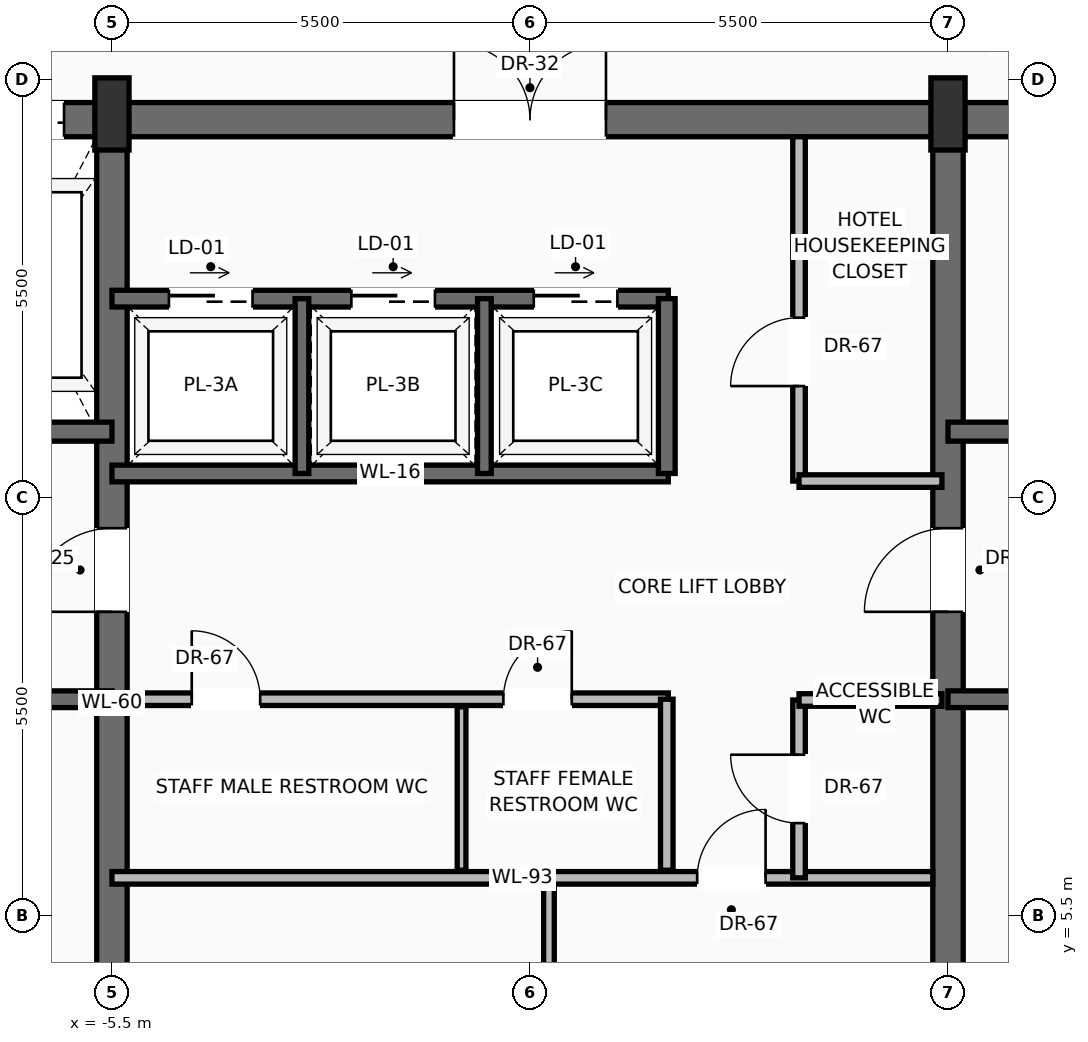
"""IFC4 building model, lengths in metres.
Left out: names, types, materials, properties, quantities, classifications, styles, units other than length and angle.
Written with IfcOpenShell. Run it as: python <this file> out.ifc"""

import sys

from ifc_helpers import new_model, si_unit, direction, frame, frame_2d, origin, origin_2d, place, context, subcontext, project, spatial, rectangle, extrude, source, transform, mapped, element, fill, save


model = new_model("IFC4")
c1 = context("Model", 3, precision=1e-05, world=origin(), true_north=direction((0.0, 1.0)))
c2 = subcontext(c1, "Body", "Model", "MODEL_VIEW")
j1 = project(units=[si_unit("LENGTHUNIT", "METRE"), si_unit("PLANEANGLEUNIT", "RADIAN")], contexts=[c1])
p1 = place(None, origin())
s1 = spatial("IfcSite", under=j1, at=p1, CompositionType="ELEMENT")
p2 = place(p1, origin())
s2 = spatial("IfcBuilding", under=s1, at=p2, CompositionType="ELEMENT")
p3 = place(p2, frame((0.0, 0.0, 273.0)))
s3 = spatial("IfcBuildingStorey", under=s2, at=p3, CompositionType="ELEMENT", Elevation=273.0)
p4 = place(p3, frame((-10.6, 15.975, 0.0), z_axis=(0.0, 0.0, 1.0), x_axis=(1.0, 0.0, 0.0)))
e1 = element("IfcWall", 1, at=p4, inside=s3, PredefinedType="SHEAR", context=c2, shape_type="SweptSolid", body=[
    extrude(rectangle(XDim=21.2, YDim=0.45, at=frame_2d((10.6, 0.0))), origin(), (0.0, 0.0, 1.0), 3.24),
])
p5 = place(p4, frame((3.17, 0.0, 0.0)))
e2 = element("IfcOpeningElement", 2, at=p5, cuts=e1, PredefinedType="OPENING", context=c2, shape_type="SweptSolid", body=[
    extrude(rectangle(XDim=1.3, YDim=2.3, at=frame_2d((0.65, 1.15))), frame((0.0, 0.235, 0.0), z_axis=(0.0, -1.0, 0.0), x_axis=(1.0, 0.0, 0.0)), (0.0, 0.0, 1.0), 0.47),
])
p6 = place(p4, frame((9.6, 0.0, 0.0)))
e3 = element("IfcOpeningElement", 3, at=p6, cuts=e1, PredefinedType="OPENING", context=c2, shape_type="SweptSolid", body=[
    extrude(rectangle(XDim=2.0, YDim=2.4, at=frame_2d((1.0, 1.2))), frame((0.0, 0.235, 0.0), z_axis=(0.0, -1.0, 0.0), x_axis=(1.0, 0.0, 0.0)), (0.0, 0.0, 1.0), 0.47),
])
p7 = place(p3, frame((-5.5, 0.625, 0.0), z_axis=(0.0, 0.0, 1.0), x_axis=(0.0, 1.0, 0.0)))
e4 = element("IfcWall", 4, at=p7, inside=s3, PredefinedType="SHEAR", context=c2, shape_type="SweptSolid", body=[
    extrude(rectangle(XDim=15.35, YDim=0.4, at=frame_2d((7.675, 0.0))), origin(), (0.0, 0.0, 1.0), 3.24),
])
p8 = place(p7, frame((8.875, 0.0, 0.0)))
e5 = element("IfcOpeningElement", 5, at=p8, cuts=e4, PredefinedType="OPENING", context=c2, shape_type="SweptSolid", body=[
    extrude(rectangle(XDim=1.1, YDim=2.2, at=frame_2d((0.55, 1.1))), frame((0.0, 0.21, 0.0), z_axis=(0.0, -1.0, 0.0), x_axis=(1.0, 0.0, 0.0)), (0.0, 0.0, 1.0), 0.42),
])
p9 = place(p3, frame((5.5, 0.625, 0.0), z_axis=(0.0, 0.0, 1.0), x_axis=(0.0, 1.0, 0.0)))
e6 = element("IfcWall", 6, at=p9, inside=s3, PredefinedType="SHEAR", context=c2, shape_type="SweptSolid", body=[
    extrude(rectangle(XDim=15.35, YDim=0.4, at=frame_2d((7.675, 0.0))), origin(), (0.0, 0.0, 1.0), 3.24),
])
p10 = place(p9, frame((8.875, 0.0, 0.0)))
e7 = element("IfcOpeningElement", 7, at=p10, cuts=e6, PredefinedType="OPENING", context=c2, shape_type="SweptSolid", body=[
    extrude(rectangle(XDim=1.1, YDim=2.2, at=frame_2d((0.55, 1.1))), frame((0.0, 0.21, 0.0), z_axis=(0.0, -1.0, 0.0), x_axis=(1.0, 0.0, 0.0)), (0.0, 0.0, 1.0), 0.42),
])
m1 = source(origin(), c2, "Body", "SweptSolid", [
    extrude(rectangle(XDim=0.45, YDim=0.95, at=origin_2d()), origin(), (0.0, 0.0, 1.0), 3.45),
])
for number, where, z_axis, x_axis in (
    (8, (-5.5, 16.05, 0.0), (0.0, 0.0, 1.0), (1.0, 0.0, 0.0)),
    (9, (5.5, 16.05, 0.0), (0.0, 0.0, 1.0), (1.0, 0.0, 0.0)),
):
    element("IfcColumn", number, at=place(p3, frame(where, z_axis=z_axis, x_axis=x_axis)), inside=s3, PredefinedType="PILASTER", context=c2, shape_type="MappedRepresentation", body=[
        mapped(m1, transform((0.0, 0.0, 0.0), scale=1.0)),
    ])
p11 = place(p3, frame((-5.5, 8.35, 0.0), z_axis=(0.0, 0.0, 1.0), x_axis=(-1.0, 0.0, 0.0)))
e10 = element("IfcWall", 10, at=p11, inside=s3, PredefinedType="SOLIDWALL", context=c2, shape_type="SweptSolid", body=[
    extrude(rectangle(XDim=4.65, YDim=0.22, at=frame_2d((2.325, 0.0))), origin(), (0.0, 0.0, 1.0), 3.24),
])
p12 = place(p11, frame((2.5, 0.0, 0.0)))
e11 = element("IfcOpeningElement", 11, at=p12, cuts=e10, PredefinedType="OPENING", context=c2, shape_type="SweptSolid", body=[
    extrude(rectangle(XDim=1.15, YDim=2.2, at=frame_2d((0.575, 1.1))), frame((0.0, 0.12, 0.0), z_axis=(0.0, -1.0, 0.0), x_axis=(1.0, 0.0, 0.0)), (0.0, 0.0, 1.0), 0.24),
])
p13 = place(p3, frame((-5.5, 11.87, 0.0), z_axis=(0.0, 0.0, 1.0), x_axis=(-1.0, 0.0, 0.0)))
e12 = element("IfcWall", 12, at=p13, inside=s3, PredefinedType="SOLIDWALL", context=c2, shape_type="SweptSolid", body=[
    extrude(rectangle(XDim=4.65, YDim=0.25, at=frame_2d((2.325, 0.0))), origin(), (0.0, 0.0, 1.0), 3.24),
])
p14 = place(p13, frame((2.95, 0.0, 0.0)))
e13 = element("IfcOpeningElement", 13, at=p14, cuts=e12, PredefinedType="OPENING", context=c2, shape_type="SweptSolid", body=[
    extrude(rectangle(XDim=1.2, YDim=2.25, at=frame_2d((0.6, 1.125))), frame((0.0, 0.135, 0.0), z_axis=(0.0, -1.0, 0.0), x_axis=(1.0, 0.0, 0.0)), (0.0, 0.0, 1.0), 0.27),
])
p15 = place(p3, frame((10.15, 8.35, 0.0), z_axis=(0.0, 0.0, 1.0), x_axis=(-1.0, 0.0, 0.0)))
e14 = element("IfcWall", 14, at=p15, inside=s3, PredefinedType="SOLIDWALL", context=c2, shape_type="SweptSolid", body=[
    extrude(rectangle(XDim=4.65, YDim=0.22, at=frame_2d((2.325, 0.0))), origin(), (0.0, 0.0, 1.0), 3.24),
])
p16 = place(p15, frame((1.0, 0.0, 0.0)))
e15 = element("IfcOpeningElement", 15, at=p16, cuts=e14, PredefinedType="OPENING", context=c2, shape_type="SweptSolid", body=[
    extrude(rectangle(XDim=1.15, YDim=2.2, at=frame_2d((0.575, 1.1))), frame((0.0, 0.12, 0.0), z_axis=(0.0, -1.0, 0.0), x_axis=(1.0, 0.0, 0.0)), (0.0, 0.0, 1.0), 0.24),
])
p17 = place(p3, frame((10.15, 11.87, 0.0), z_axis=(0.0, 0.0, 1.0), x_axis=(-1.0, 0.0, 0.0)))
e16 = element("IfcWall", 16, at=p17, inside=s3, PredefinedType="SOLIDWALL", context=c2, shape_type="SweptSolid", body=[
    extrude(rectangle(XDim=4.65, YDim=0.25, at=frame_2d((2.325, 0.0))), origin(), (0.0, 0.0, 1.0), 3.24),
])
p18 = place(p17, frame((0.5, 0.0, 0.0)))
e17 = element("IfcOpeningElement", 17, at=p18, cuts=e16, PredefinedType="OPENING", context=c2, shape_type="SweptSolid", body=[
    extrude(rectangle(XDim=1.2, YDim=2.25, at=frame_2d((0.6, 1.125))), frame((0.0, 0.135, 0.0), z_axis=(0.0, -1.0, 0.0), x_axis=(1.0, 0.0, 0.0)), (0.0, 0.0, 1.0), 0.27),
])
p19 = place(p3, frame((-5.5, 6.0, 0.0), z_axis=(0.0, 0.0, 1.0), x_axis=(1.0, 0.0, 0.0)))
e18 = element("IfcWall", 18, at=p19, inside=s3, PredefinedType="PARTITIONING", context=c2, shape_type="SweptSolid", body=[
    extrude(rectangle(XDim=10.8, YDim=0.165, at=frame_2d((5.4, 0.0))), origin(), (0.0, 0.0, 1.0), 3.232),
])
p20 = place(p19, frame((7.7, 0.0, 0.0)))
e19 = element("IfcOpeningElement", 19, at=p20, cuts=e18, PredefinedType="OPENING", context=c2, shape_type="SweptSolid", body=[
    extrude(rectangle(XDim=0.9, YDim=2.1, at=frame_2d((0.45, 1.05))), frame((0.0, 0.093, 0.0), z_axis=(0.0, -1.0, 0.0), x_axis=(1.0, 0.0, 0.0)), (0.0, 0.0, 1.0), 0.185),
])
p21 = place(p3, frame((0.25, 0.85, 0.0), z_axis=(0.0, 0.0, 1.0), x_axis=(0.0, 1.0, 0.0)))
e20 = element("IfcWall", 20, at=p21, inside=s3, PredefinedType="PARTITIONING", context=c2, shape_type="SweptSolid", body=[
    extrude(rectangle(XDim=5.03, YDim=0.14, at=frame_2d((2.515, 0.0))), origin(), (0.0, 0.0, 1.0), 3.232),
])
p22 = place(p21, frame((2.1, 0.0, 0.0)))
e21 = element("IfcOpeningElement", 21, at=p22, cuts=e20, PredefinedType="OPENING", context=c2, shape_type="SweptSolid", body=[
    extrude(rectangle(XDim=0.9, YDim=2.1, at=frame_2d((0.45, 1.05))), frame((0.0, 0.08, 0.0), z_axis=(0.0, -1.0, 0.0), x_axis=(1.0, 0.0, 0.0)), (0.0, 0.0, 1.0), 0.16),
])
p23 = place(p3, frame((3.54, 6.0, 0.0), z_axis=(0.0, 0.0, 1.0), x_axis=(0.0, 1.0, 0.0)))
e22 = element("IfcWall", 22, at=p23, inside=s3, PredefinedType="PARTITIONING", context=c2, shape_type="SweptSolid", body=[
    extrude(rectangle(XDim=2.34, YDim=0.165, at=frame_2d((1.17, 0.0))), origin(), (0.0, 0.0, 1.0), 3.232),
])
p24 = place(p23, frame((0.72, 0.0, 0.0)))
e23 = element("IfcOpeningElement", 23, at=p24, cuts=e22, PredefinedType="OPENING", context=c2, shape_type="SweptSolid", body=[
    extrude(rectangle(XDim=0.9, YDim=2.1, at=frame_2d((0.45, 1.05))), frame((0.0, 0.093, 0.0), z_axis=(0.0, -1.0, 0.0), x_axis=(1.0, 0.0, 0.0)), (0.0, 0.0, 1.0), 0.185),
])
p25 = place(p3, frame((3.54, 8.34, 0.0), z_axis=(0.0, 0.0, 1.0), x_axis=(1.0, 0.0, 0.0)))
e24 = element("IfcWall", 24, at=p25, inside=s3, PredefinedType="PARTITIONING", context=c2, shape_type="SweptSolid", body=[
    extrude(rectangle(XDim=1.88, YDim=0.165, at=frame_2d((0.94, 0.0))), origin(), (0.0, 0.0, 1.0), 3.232),
])
p26 = place(p3, frame((-5.3, 8.35, 0.0), z_axis=(0.0, 0.0, 1.0), x_axis=(1.0, 0.0, 0.0)))
e25 = element("IfcWall", 25, at=p26, inside=s3, PredefinedType="PARTITIONING", context=c2, shape_type="SweptSolid", body=[
    extrude(rectangle(XDim=7.12, YDim=0.165, at=frame_2d((3.56, 0.0))), origin(), (0.0, 0.0, 1.0), 3.232),
])
p27 = place(p26, frame((0.85, 0.0, 0.0)))
e26 = element("IfcOpeningElement", 26, at=p27, cuts=e25, PredefinedType="OPENING", context=c2, shape_type="SweptSolid", body=[
    extrude(rectangle(XDim=0.9, YDim=2.1, at=frame_2d((0.45, 1.05))), frame((0.0, 0.093, 0.0), z_axis=(0.0, -1.0, 0.0), x_axis=(1.0, 0.0, 0.0)), (0.0, 0.0, 1.0), 0.185),
])
p28 = place(p26, frame((4.95, 0.0, 0.0)))
e27 = element("IfcOpeningElement", 27, at=p28, cuts=e25, PredefinedType="OPENING", context=c2, shape_type="SweptSolid", body=[
    extrude(rectangle(XDim=0.9, YDim=2.1, at=frame_2d((0.45, 1.05))), frame((0.0, 0.093, 0.0), z_axis=(0.0, -1.0, 0.0), x_axis=(1.0, 0.0, 0.0)), (0.0, 0.0, 1.0), 0.185),
])
p29 = place(p3, frame((1.8, 6.1, 0.0), z_axis=(0.0, 0.0, 1.0), x_axis=(0.0, 1.0, 0.0)))
e28 = element("IfcWall", 28, at=p29, inside=s3, PredefinedType="PARTITIONING", context=c2, shape_type="SweptSolid", body=[
    extrude(rectangle(XDim=2.25, YDim=0.165, at=frame_2d((1.125, 0.0))), origin(), (0.0, 0.0, 1.0), 3.232),
])
p30 = place(p3, frame((-0.9, 6.1, 0.0), z_axis=(0.0, 0.0, 1.0), x_axis=(0.0, 1.0, 0.0)))
e29 = element("IfcWall", 29, at=p30, inside=s3, PredefinedType="PARTITIONING", context=c2, shape_type="SweptSolid", body=[
    extrude(rectangle(XDim=2.15, YDim=0.115, at=frame_2d((1.075, 0.0))), origin(), (0.0, 0.0, 1.0), 3.232),
])
p31 = place(p3, frame((-5.5, 11.32, 0.0), z_axis=(0.0, 0.0, 1.0), x_axis=(1.0, 0.0, 0.0)))
e30 = element("IfcWall", 30, at=p31, inside=s3, PredefinedType="SOLIDWALL", context=c2, shape_type="SweptSolid", body=[
    extrude(rectangle(XDim=7.32, YDim=0.22, at=frame_2d((3.66, 0.0))), origin(), (0.0, 0.0, 1.0), 3.24),
])
p32 = place(p3, frame((-5.5, 13.62, 0.0), z_axis=(0.0, 0.0, 1.0), x_axis=(1.0, 0.0, 0.0)))
e31 = element("IfcWall", 31, at=p32, inside=s3, PredefinedType="SOLIDWALL", context=c2, shape_type="SweptSolid", body=[
    extrude(rectangle(XDim=7.32, YDim=0.22, at=frame_2d((3.66, 0.0))), origin(), (0.0, 0.0, 1.0), 3.24),
])
p33 = place(p32, frame((0.75, 0.0, 0.0)))
e32 = element("IfcOpeningElement", 32, at=p33, cuts=e31, PredefinedType="OPENING", context=c2, shape_type="SweptSolid", body=[
    extrude(rectangle(XDim=1.1, YDim=2.2, at=frame_2d((0.55, 1.1))), frame((0.0, 0.12, 0.0), z_axis=(0.0, -1.0, 0.0), x_axis=(1.0, 0.0, 0.0)), (0.0, 0.0, 1.0), 0.24),
])
p34 = place(p32, frame((3.15, 0.0, 0.0)))
e33 = element("IfcOpeningElement", 33, at=p34, cuts=e31, PredefinedType="OPENING", context=c2, shape_type="SweptSolid", body=[
    extrude(rectangle(XDim=1.1, YDim=2.2, at=frame_2d((0.55, 1.1))), frame((0.0, 0.12, 0.0), z_axis=(0.0, -1.0, 0.0), x_axis=(1.0, 0.0, 0.0)), (0.0, 0.0, 1.0), 0.24),
])
p35 = place(p32, frame((5.55, 0.0, 0.0)))
e34 = element("IfcOpeningElement", 34, at=p35, cuts=e31, PredefinedType="OPENING", context=c2, shape_type="SweptSolid", body=[
    extrude(rectangle(XDim=1.1, YDim=2.2, at=frame_2d((0.55, 1.1))), frame((0.0, 0.12, 0.0), z_axis=(0.0, -1.0, 0.0), x_axis=(1.0, 0.0, 0.0)), (0.0, 0.0, 1.0), 0.24),
])
p36 = place(p3, frame((1.8, 11.32, 0.0), z_axis=(0.0, 0.0, 1.0), x_axis=(0.0, 1.0, 0.0)))
e35 = element("IfcWall", 35, at=p36, inside=s3, PredefinedType="SOLIDWALL", context=c2, shape_type="SweptSolid", body=[
    extrude(rectangle(XDim=2.3, YDim=0.22, at=frame_2d((1.15, 0.0))), origin(), (0.0, 0.0, 1.0), 3.24),
])
for number, where, z_axis, x_axis in (
    (36, (-3.0, 11.32, 0.0), (0.0, 0.0, 1.0), (0.0, 1.0, 0.0)),
    (37, (-0.6, 11.32, 0.0), (0.0, 0.0, 1.0), (0.0, 1.0, 0.0)),
):
    element("IfcWall", number, at=place(p3, frame(where, z_axis=z_axis, x_axis=x_axis)), inside=s3, PredefinedType="SOLIDWALL", context=c2, shape_type="SweptSolid", body=[
        extrude(rectangle(XDim=2.3, YDim=0.18, at=frame_2d((1.15, 0.0))), origin(), (0.0, 0.0, 1.0), 3.24),
    ])
p37 = place(p3, frame((3.54, 11.22, 0.0), z_axis=(0.0, 0.0, 1.0), x_axis=(0.0, 1.0, 0.0)))
e38 = element("IfcWall", 38, at=p37, inside=s3, PredefinedType="PARTITIONING", context=c2, shape_type="SweptSolid", body=[
    extrude(rectangle(XDim=4.53, YDim=0.165, at=frame_2d((2.265, 0.0))), origin(), (0.0, 0.0, 1.0), 3.232),
])
p38 = place(p37, frame((1.25, 0.0, 0.0)))
e39 = element("IfcOpeningElement", 39, at=p38, cuts=e38, PredefinedType="OPENING", context=c2, shape_type="SweptSolid", body=[
    extrude(rectangle(XDim=0.9, YDim=2.1, at=frame_2d((0.45, 1.05))), frame((0.0, 0.093, 0.0), z_axis=(0.0, -1.0, 0.0), x_axis=(1.0, 0.0, 0.0)), (0.0, 0.0, 1.0), 0.185),
])
p39 = place(p3, frame((3.54, 11.22, 0.0), z_axis=(0.0, 0.0, 1.0), x_axis=(1.0, 0.0, 0.0)))
e40 = element("IfcWall", 40, at=p39, inside=s3, PredefinedType="PARTITIONING", context=c2, shape_type="SweptSolid", body=[
    extrude(rectangle(XDim=1.88, YDim=0.165, at=frame_2d((0.94, 0.0))), origin(), (0.0, 0.0, 1.0), 3.232),
])
m2 = source(origin(), c2, "Body", "SweptSolid", [
    extrude(rectangle(XDim=1.1, YDim=2.2, at=frame_2d((0.55, 1.1))), frame((0.0, 0.025, 0.0), z_axis=(0.0, -1.0, 0.0), x_axis=(1.0, 0.0, 0.0)), (0.0, 0.0, 1.0), 0.05),
])
p40 = place(p8, origin())
e41 = element("IfcDoor", 41, at=p40, inside=s3, OperationType="SINGLE_SWING_LEFT", PredefinedType="DOOR", context=c2, shape_type="MappedRepresentation", body=[
    mapped(m2, transform((0.0, 0.0, 0.0), scale=1.0)),
])
fill(e5, e41)
m3 = source(origin(), c2, "Body", "SweptSolid", [
    extrude(rectangle(XDim=1.3, YDim=2.3, at=frame_2d((0.65, 1.15))), frame((0.0, 0.025, 0.0), z_axis=(0.0, -1.0, 0.0), x_axis=(1.0, 0.0, 0.0)), (0.0, 0.0, 1.0), 0.05),
])
p41 = place(p5, origin())
e42 = element("IfcDoor", 42, at=p41, inside=s3, OperationType="SLIDING_TO_RIGHT", PredefinedType="DOOR", context=c2, shape_type="MappedRepresentation", body=[
    mapped(m3, transform((0.0, 0.0, 0.0), scale=1.0)),
])
fill(e2, e42)
p42 = place(p10, origin())
e43 = element("IfcDoor", 43, at=p42, inside=s3, OperationType="SINGLE_SWING_LEFT", PredefinedType="DOOR", context=c2, shape_type="MappedRepresentation", body=[
    mapped(m2, transform((0.0, 0.0, 0.0), scale=1.0)),
])
fill(e7, e43)
m4 = source(origin(), c2, "Body", "SweptSolid", [
    extrude(rectangle(XDim=2.0, YDim=2.4, at=frame_2d((1.0, 1.2))), frame((0.0, 0.025, 0.0), z_axis=(0.0, -1.0, 0.0), x_axis=(1.0, 0.0, 0.0)), (0.0, 0.0, 1.0), 0.05),
])
p43 = place(p6, origin())
e44 = element("IfcDoor", 44, at=p43, inside=s3, OperationType="DOUBLE_DOOR_SINGLE_SWING", PredefinedType="DOOR", context=c2, shape_type="MappedRepresentation", body=[
    mapped(m4, transform((0.0, 0.0, 0.0), scale=1.0)),
])
fill(e3, e44)
m5 = source(origin(), c2, "Body", "SweptSolid", [
    extrude(rectangle(XDim=0.9, YDim=2.1, at=frame_2d((0.45, 1.05))), frame((0.0, 0.025, 0.0), z_axis=(0.0, -1.0, 0.0), x_axis=(1.0, 0.0, 0.0)), (0.0, 0.0, 1.0), 0.05),
])
p44 = place(p20, origin())
e45 = element("IfcDoor", 45, at=p44, inside=s3, OperationType="SINGLE_SWING_RIGHT", PredefinedType="DOOR", context=c2, shape_type="MappedRepresentation", body=[
    mapped(m5, transform((0.0, 0.0, 0.0), scale=1.0)),
])
fill(e19, e45)
p45 = place(p24, origin())
e46 = element("IfcDoor", 46, at=p45, inside=s3, OperationType="SINGLE_SWING_RIGHT", PredefinedType="DOOR", context=c2, shape_type="MappedRepresentation", body=[
    mapped(m5, transform((0.0, 0.0, 0.0), scale=1.0)),
])
fill(e23, e46)
p46 = place(p27, origin())
e47 = element("IfcDoor", 47, at=p46, inside=s3, OperationType="SINGLE_SWING_LEFT", PredefinedType="DOOR", context=c2, shape_type="MappedRepresentation", body=[
    mapped(m5, transform((0.0, 0.0, 0.0), scale=1.0)),
])
fill(e26, e47)
p47 = place(p28, origin())
e48 = element("IfcDoor", 48, at=p47, inside=s3, OperationType="SINGLE_SWING_RIGHT", PredefinedType="DOOR", context=c2, shape_type="MappedRepresentation", body=[
    mapped(m5, transform((0.0, 0.0, 0.0), scale=1.0)),
])
fill(e27, e48)
m6 = source(origin(), c2, "Body", "SweptSolid", [
    extrude(rectangle(XDim=1.1, YDim=2.2, at=frame_2d((0.55, 1.1))), frame((0.0, 0.025, 0.0), z_axis=(0.0, -1.0, 0.0), x_axis=(1.0, 0.0, 0.0)), (0.0, 0.0, 1.0), 0.05),
])
p48 = place(p33, origin())
e49 = element("IfcDoor", 49, at=p48, inside=s3, OperationType="SLIDING_TO_RIGHT", PredefinedType="DOOR", context=c2, shape_type="MappedRepresentation", body=[
    mapped(m6, transform((0.0, 0.0, 0.0), scale=1.0)),
])
fill(e32, e49)
p49 = place(p34, origin())
e50 = element("IfcDoor", 50, at=p49, inside=s3, OperationType="SLIDING_TO_RIGHT", PredefinedType="DOOR", context=c2, shape_type="MappedRepresentation", body=[
    mapped(m6, transform((0.0, 0.0, 0.0), scale=1.0)),
])
fill(e33, e50)
p50 = place(p35, origin())
e51 = element("IfcDoor", 51, at=p50, inside=s3, OperationType="SLIDING_TO_RIGHT", PredefinedType="DOOR", context=c2, shape_type="MappedRepresentation", body=[
    mapped(m6, transform((0.0, 0.0, 0.0), scale=1.0)),
])
fill(e34, e51)
p51 = place(p38, origin())
e52 = element("IfcDoor", 52, at=p51, inside=s3, OperationType="SINGLE_SWING_LEFT", PredefinedType="DOOR", context=c2, shape_type="MappedRepresentation", body=[
    mapped(m5, transform((0.0, 0.0, 0.0), scale=1.0)),
])
fill(e39, e52)
save(model, sys.argv[1])
